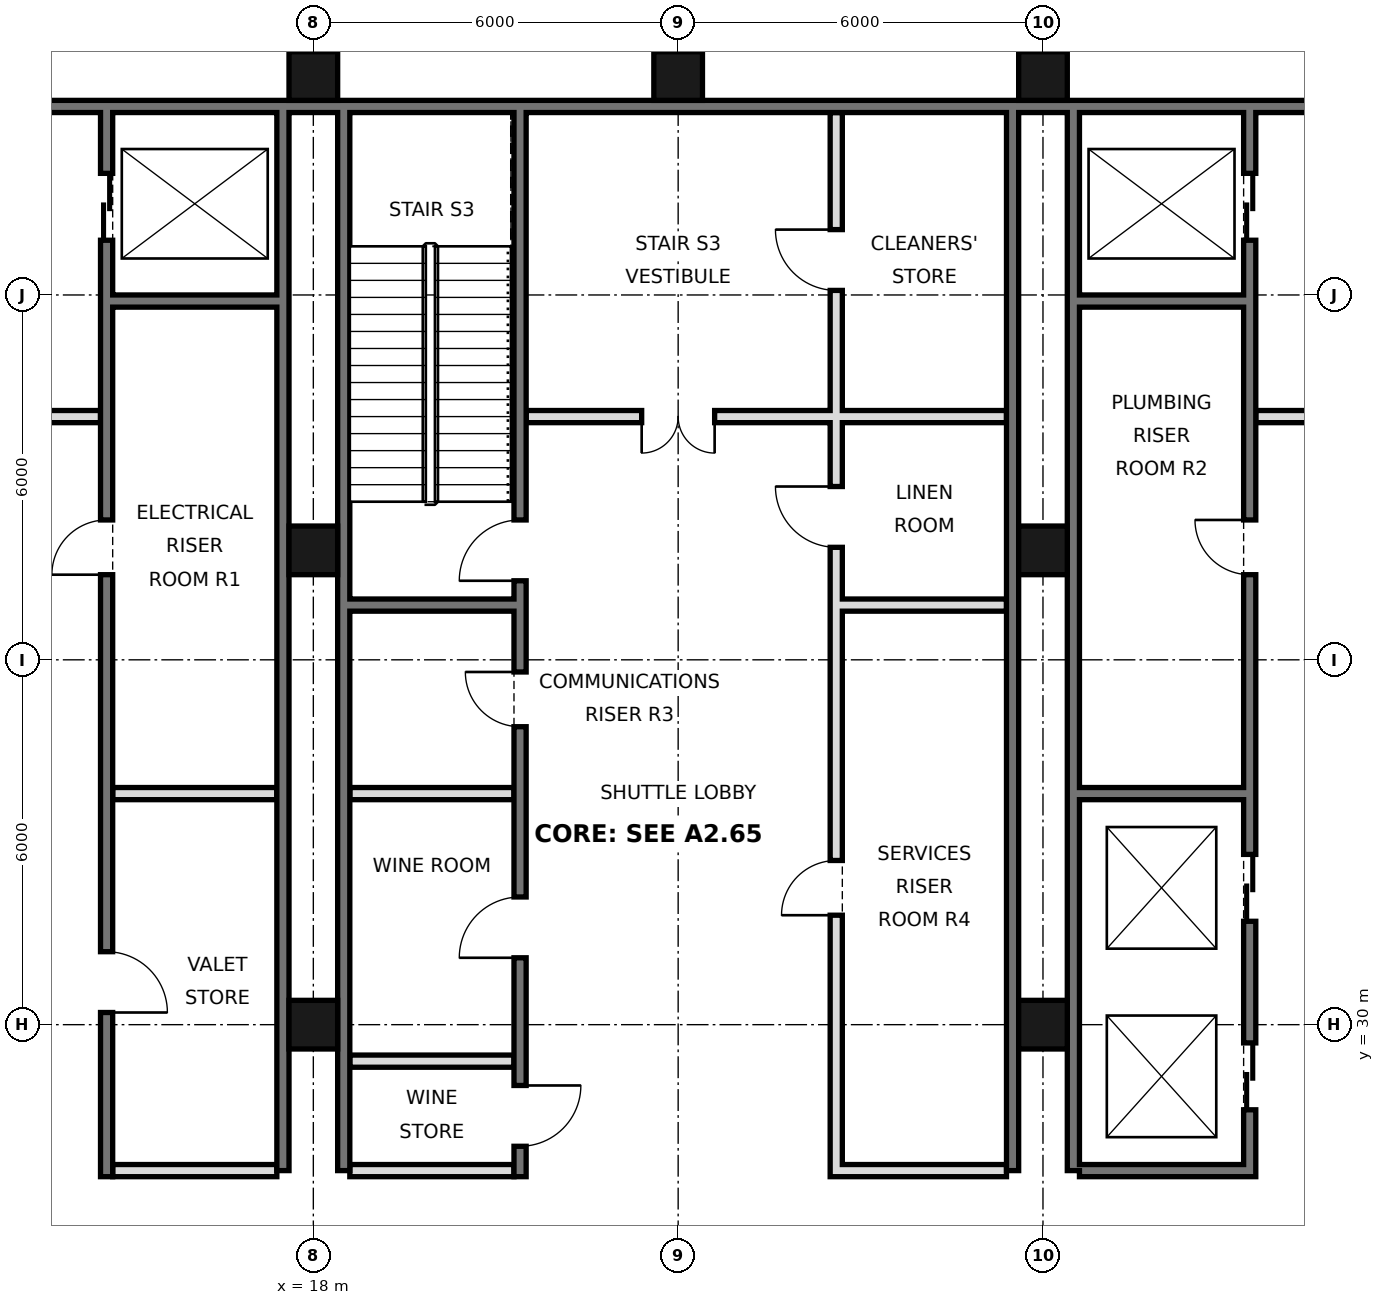
"""IFC4 building model, lengths in metres.
Left out: names, types, materials, properties, quantities, classifications, styles, units other than length and angle.
Written with IfcOpenShell. Run it as: python <this file> out.ifc"""

import sys

from ifc_helpers import new_model, si_unit, direction, frame, frame_2d, origin, origin_2d, place, context, subcontext, project, spatial, rectangle, hollow_rectangle, extrude, element, fill, save


model = new_model("IFC4")
c1 = context("Model", 3, precision=1e-05, world=origin(), true_north=direction((0.0, 1.0)))
c2 = subcontext(c1, "Body", "Model", "MODEL_VIEW")
j1 = project(units=[si_unit("LENGTHUNIT", "METRE"), si_unit("PLANEANGLEUNIT", "RADIAN")], contexts=[c1])
p1 = place(None, origin())
s1 = spatial("IfcSite", under=j1, at=p1, CompositionType="ELEMENT")
p2 = place(p1, origin())
s2 = spatial("IfcBuilding", under=s1, at=p2, CompositionType="ELEMENT")
p3 = place(p2, frame((0.0, 0.0, 257.6)))
s3 = spatial("IfcBuildingStorey", under=s2, at=p3, CompositionType="ELEMENT", Elevation=257.6)
for number, where, z_axis, x_axis in (
    (1, (18.0, 30.0, 0.0), (0.0, 0.0, 1.0), (1.0, 0.0, 0.0)),
    (2, (18.0, 37.8, 0.0), (0.0, 0.0, 1.0), (1.0, 0.0, 0.0)),
    (3, (18.0, 45.6, 0.0), (0.0, 0.0, 1.0), (1.0, 0.0, 0.0)),
    (4, (24.0, 45.6, 0.0), (0.0, 0.0, 1.0), (1.0, 0.0, 0.0)),
    (5, (30.0, 30.0, 0.0), (0.0, 0.0, 1.0), (1.0, 0.0, 0.0)),
    (6, (30.0, 37.8, 0.0), (0.0, 0.0, 1.0), (1.0, 0.0, 0.0)),
    (7, (30.0, 45.6, 0.0), (0.0, 0.0, 1.0), (1.0, 0.0, 0.0)),
):
    element("IfcColumn", number, at=place(p3, frame(where, z_axis=z_axis, x_axis=x_axis)), inside=s3, PredefinedType="COLUMN", context=c2, shape_type="SweptSolid", body=[
        extrude(hollow_rectangle(XDim=0.8, YDim=0.8, WallThickness=0.032, at=origin_2d()), origin(), (0.0, 0.0, 1.0), 5.4),
    ])
p4 = place(p3, frame((6.6, 45.1, 0.0), z_axis=(0.0, 0.0, 1.0), x_axis=(1.0, 0.0, 0.0)))
e8 = element("IfcWall", 8, at=p4, inside=s3, PredefinedType="SOLIDWALL", context=c2, shape_type="SweptSolid", body=[
    extrude(rectangle(XDim=34.8, YDim=0.2, at=frame_2d((17.4, 0.0))), origin(), (0.0, 0.0, 1.0), 5.22),
])
for number, where, z_axis, x_axis in (
    (9, (17.5, 27.6, 0.0), (0.0, 0.0, 1.0), (0.0, 1.0, 0.0)),
    (10, (18.5, 27.6, 0.0), (0.0, 0.0, 1.0), (0.0, 1.0, 0.0)),
    (11, (29.5, 27.6, 0.0), (0.0, 0.0, 1.0), (0.0, 1.0, 0.0)),
    (12, (30.5, 27.6, 0.0), (0.0, 0.0, 1.0), (0.0, 1.0, 0.0)),
):
    element("IfcWall", number, at=place(p3, frame(where, z_axis=z_axis, x_axis=x_axis)), inside=s3, PredefinedType="SOLIDWALL", context=c2, shape_type="SweptSolid", body=[
        extrude(rectangle(XDim=17.5, YDim=0.2, at=frame_2d((8.75, 0.0))), origin(), (0.0, 0.0, 1.0), 5.22),
    ])
p5 = place(p3, frame((14.6, 27.5, 0.0), z_axis=(0.0, 0.0, 1.0), x_axis=(0.0, 1.0, 0.0)))
e13 = element("IfcWall", 13, at=p5, inside=s3, PredefinedType="SOLIDWALL", context=c2, shape_type="SweptSolid", body=[
    extrude(rectangle(XDim=17.5, YDim=0.2, at=frame_2d((8.75, 0.0))), origin(), (0.0, 0.0, 1.0), 5.22),
])
p6 = place(p5, frame((15.4, 0.0, 0.0)))
e14 = element("IfcOpeningElement", 14, at=p6, cuts=e13, PredefinedType="OPENING", context=c2, shape_type="SweptSolid", body=[
    extrude(rectangle(XDim=1.1, YDim=2.1, at=frame_2d((0.55, 1.05))), frame((0.0, 0.11, 0.0), z_axis=(0.0, -1.0, 0.0), x_axis=(1.0, 0.0, 0.0)), (0.0, 0.0, 1.0), 0.22),
])
p7 = place(p5, frame((2.7, 0.0, 0.0)))
e15 = element("IfcOpeningElement", 15, at=p7, cuts=e13, PredefinedType="OPENING", context=c2, shape_type="SweptSolid", body=[
    extrude(rectangle(XDim=1.0, YDim=2.1, at=frame_2d((0.5, 1.05))), frame((0.0, 0.11, 0.0), z_axis=(0.0, -1.0, 0.0), x_axis=(1.0, 0.0, 0.0)), (0.0, 0.0, 1.0), 0.22),
])
p8 = place(p5, frame((9.9, 0.0, 0.0)))
e16 = element("IfcOpeningElement", 16, at=p8, cuts=e13, PredefinedType="OPENING", context=c2, shape_type="SweptSolid", body=[
    extrude(rectangle(XDim=0.9, YDim=2.1, at=frame_2d((0.45, 1.05))), frame((0.0, 0.11, 0.0), z_axis=(0.0, -1.0, 0.0), x_axis=(1.0, 0.0, 0.0)), (0.0, 0.0, 1.0), 0.22),
])
p9 = place(p3, frame((21.4, 27.5, 0.0), z_axis=(0.0, 0.0, 1.0), x_axis=(0.0, 1.0, 0.0)))
e17 = element("IfcWall", 17, at=p9, inside=s3, PredefinedType="SOLIDWALL", context=c2, shape_type="SweptSolid", body=[
    extrude(rectangle(XDim=17.5, YDim=0.2, at=frame_2d((8.75, 0.0))), origin(), (0.0, 0.0, 1.0), 5.22),
])
p10 = place(p9, frame((0.5, 0.0, 0.0)))
e18 = element("IfcOpeningElement", 18, at=p10, cuts=e17, PredefinedType="OPENING", context=c2, shape_type="SweptSolid", body=[
    extrude(rectangle(XDim=1.0, YDim=2.1, at=frame_2d((0.5, 1.05))), frame((0.0, 0.11, 0.0), z_axis=(0.0, -1.0, 0.0), x_axis=(1.0, 0.0, 0.0)), (0.0, 0.0, 1.0), 0.22),
])
p11 = place(p9, frame((3.6, 0.0, 0.0)))
e19 = element("IfcOpeningElement", 19, at=p11, cuts=e17, PredefinedType="OPENING", context=c2, shape_type="SweptSolid", body=[
    extrude(rectangle(XDim=1.0, YDim=2.1, at=frame_2d((0.5, 1.05))), frame((0.0, 0.11, 0.0), z_axis=(0.0, -1.0, 0.0), x_axis=(1.0, 0.0, 0.0)), (0.0, 0.0, 1.0), 0.22),
])
p12 = place(p9, frame((9.8, 0.0, 0.0)))
e20 = element("IfcOpeningElement", 20, at=p12, cuts=e17, PredefinedType="OPENING", context=c2, shape_type="SweptSolid", body=[
    extrude(rectangle(XDim=1.0, YDim=2.1, at=frame_2d((0.5, 1.05))), frame((0.0, 0.11, 0.0), z_axis=(0.0, -1.0, 0.0), x_axis=(1.0, 0.0, 0.0)), (0.0, 0.0, 1.0), 0.22),
])
p13 = place(p9, frame((7.4, 0.0, 0.0)))
e21 = element("IfcOpeningElement", 21, at=p13, cuts=e17, PredefinedType="OPENING", context=c2, shape_type="SweptSolid", body=[
    extrude(rectangle(XDim=0.9, YDim=2.1, at=frame_2d((0.45, 1.05))), frame((0.0, 0.11, 0.0), z_axis=(0.0, -1.0, 0.0), x_axis=(1.0, 0.0, 0.0)), (0.0, 0.0, 1.0), 0.22),
])
p14 = place(p3, frame((26.6, 27.5, 0.0), z_axis=(0.0, 0.0, 1.0), x_axis=(0.0, 1.0, 0.0)))
e22 = element("IfcWall", 22, at=p14, inside=s3, PredefinedType="SOLIDWALL", context=c2, shape_type="SweptSolid", body=[
    extrude(rectangle(XDim=17.5, YDim=0.2, at=frame_2d((8.75, 0.0))), origin(), (0.0, 0.0, 1.0), 5.22),
])
p15 = place(p14, frame((4.3, 0.0, 0.0)))
e23 = element("IfcOpeningElement", 23, at=p15, cuts=e22, PredefinedType="OPENING", context=c2, shape_type="SweptSolid", body=[
    extrude(rectangle(XDim=0.9, YDim=2.1, at=frame_2d((0.45, 1.05))), frame((0.0, 0.11, 0.0), z_axis=(0.0, -1.0, 0.0), x_axis=(1.0, 0.0, 0.0)), (0.0, 0.0, 1.0), 0.22),
])
p16 = place(p14, frame((10.35, 0.0, 0.0)))
e24 = element("IfcOpeningElement", 24, at=p16, cuts=e22, PredefinedType="OPENING", context=c2, shape_type="SweptSolid", body=[
    extrude(rectangle(XDim=1.0, YDim=2.1, at=frame_2d((0.5, 1.05))), frame((0.0, 0.11, 0.0), z_axis=(0.0, -1.0, 0.0), x_axis=(1.0, 0.0, 0.0)), (0.0, 0.0, 1.0), 0.22),
])
p17 = place(p14, frame((14.575, 0.0, 0.0)))
e25 = element("IfcOpeningElement", 25, at=p17, cuts=e22, PredefinedType="OPENING", context=c2, shape_type="SweptSolid", body=[
    extrude(rectangle(XDim=1.0, YDim=2.1, at=frame_2d((0.5, 1.05))), frame((0.0, 0.11, 0.0), z_axis=(0.0, -1.0, 0.0), x_axis=(1.0, 0.0, 0.0)), (0.0, 0.0, 1.0), 0.22),
])
p18 = place(p3, frame((33.4, 27.5, 0.0), z_axis=(0.0, 0.0, 1.0), x_axis=(0.0, 1.0, 0.0)))
e26 = element("IfcWall", 26, at=p18, inside=s3, PredefinedType="SOLIDWALL", context=c2, shape_type="SweptSolid", body=[
    extrude(rectangle(XDim=17.5, YDim=0.2, at=frame_2d((8.75, 0.0))), origin(), (0.0, 0.0, 1.0), 5.22),
])
p19 = place(p18, frame((1.1, 0.0, 0.0)))
e27 = element("IfcOpeningElement", 27, at=p19, cuts=e26, PredefinedType="OPENING", context=c2, shape_type="SweptSolid", body=[
    extrude(rectangle(XDim=1.1, YDim=2.1, at=frame_2d((0.55, 1.05))), frame((0.0, 0.11, 0.0), z_axis=(0.0, -1.0, 0.0), x_axis=(1.0, 0.0, 0.0)), (0.0, 0.0, 1.0), 0.22),
])
p20 = place(p18, frame((4.2, 0.0, 0.0)))
e28 = element("IfcOpeningElement", 28, at=p20, cuts=e26, PredefinedType="OPENING", context=c2, shape_type="SweptSolid", body=[
    extrude(rectangle(XDim=1.1, YDim=2.1, at=frame_2d((0.55, 1.05))), frame((0.0, 0.11, 0.0), z_axis=(0.0, -1.0, 0.0), x_axis=(1.0, 0.0, 0.0)), (0.0, 0.0, 1.0), 0.22),
])
p21 = place(p18, frame((15.4, 0.0, 0.0)))
e29 = element("IfcOpeningElement", 29, at=p21, cuts=e26, PredefinedType="OPENING", context=c2, shape_type="SweptSolid", body=[
    extrude(rectangle(XDim=1.1, YDim=2.1, at=frame_2d((0.55, 1.05))), frame((0.0, 0.11, 0.0), z_axis=(0.0, -1.0, 0.0), x_axis=(1.0, 0.0, 0.0)), (0.0, 0.0, 1.0), 0.22),
])
p22 = place(p18, frame((9.9, 0.0, 0.0)))
e30 = element("IfcOpeningElement", 30, at=p22, cuts=e26, PredefinedType="OPENING", context=c2, shape_type="SweptSolid", body=[
    extrude(rectangle(XDim=0.9, YDim=2.1, at=frame_2d((0.45, 1.05))), frame((0.0, 0.11, 0.0), z_axis=(0.0, -1.0, 0.0), x_axis=(1.0, 0.0, 0.0)), (0.0, 0.0, 1.0), 0.22),
])
for number, where, z_axis, x_axis in (
    (31, (14.7, 27.6, 0.0), (0.0, 0.0, 1.0), (1.0, 0.0, 0.0)),
    (32, (18.6, 27.6, 0.0), (0.0, 0.0, 1.0), (1.0, 0.0, 0.0)),
):
    element("IfcWall", number, at=place(p3, frame(where, z_axis=z_axis, x_axis=x_axis)), inside=s3, PredefinedType="PARTITIONING", context=c2, shape_type="SweptSolid", body=[
        extrude(rectangle(XDim=2.7, YDim=0.2, at=frame_2d((1.35, 0.0))), origin(), (0.0, 0.0, 1.0), 5.22),
    ])
for number, where, z_axis, x_axis in (
    (33, (26.7, 27.6, 0.0), (0.0, 0.0, 1.0), (1.0, 0.0, 0.0)),
    (34, (30.6, 27.6, 0.0), (0.0, 0.0, 1.0), (1.0, 0.0, 0.0)),
):
    element("IfcWall", number, at=place(p3, frame(where, z_axis=z_axis, x_axis=x_axis)), inside=s3, PredefinedType="SOLIDWALL", context=c2, shape_type="SweptSolid", body=[
        extrude(rectangle(XDim=2.7, YDim=0.2, at=frame_2d((1.35, 0.0))), origin(), (0.0, 0.0, 1.0), 5.22),
    ])
p23 = place(p3, frame((18.6, 29.4, 0.0), z_axis=(0.0, 0.0, 1.0), x_axis=(1.0, 0.0, 0.0)))
e35 = element("IfcWall", 35, at=p23, inside=s3, PredefinedType="PARTITIONING", context=c2, shape_type="SweptSolid", body=[
    extrude(rectangle(XDim=2.7, YDim=0.2, at=frame_2d((1.35, 0.0))), origin(), (0.0, 0.0, 1.0), 5.22),
])
for number, where, z_axis, x_axis in (
    (36, (14.7, 33.8, 0.0), (0.0, 0.0, 1.0), (1.0, 0.0, 0.0)),
    (37, (18.6, 33.8, 0.0), (0.0, 0.0, 1.0), (1.0, 0.0, 0.0)),
    (38, (30.6, 33.8, 0.0), (0.0, 0.0, 1.0), (1.0, 0.0, 0.0)),
    (39, (18.6, 36.9, 0.0), (0.0, 0.0, 1.0), (1.0, 0.0, 0.0)),
    (40, (26.7, 36.9, 0.0), (0.0, 0.0, 1.0), (1.0, 0.0, 0.0)),
):
    element("IfcWall", number, at=place(p3, frame(where, z_axis=z_axis, x_axis=x_axis)), inside=s3, PredefinedType="SOLIDWALL", context=c2, shape_type="SweptSolid", body=[
        extrude(rectangle(XDim=2.7, YDim=0.2, at=frame_2d((1.35, 0.0))), origin(), (0.0, 0.0, 1.0), 5.22),
    ])
p24 = place(p3, frame((21.5, 40.0, 0.0), z_axis=(0.0, 0.0, 1.0), x_axis=(1.0, 0.0, 0.0)))
e41 = element("IfcWall", 41, at=p24, inside=s3, PredefinedType="PARTITIONING", context=c2, shape_type="SweptSolid", body=[
    extrude(rectangle(XDim=7.9, YDim=0.2, at=frame_2d((3.95, 0.0))), origin(), (0.0, 0.0, 1.0), 5.22),
])
p25 = place(p24, frame((1.9, 0.0, 0.0)))
e42 = element("IfcOpeningElement", 42, at=p25, cuts=e41, PredefinedType="OPENING", context=c2, shape_type="SweptSolid", body=[
    extrude(rectangle(XDim=1.2, YDim=2.1, at=frame_2d((0.6, 1.05))), frame((0.0, 0.11, 0.0), z_axis=(0.0, -1.0, 0.0), x_axis=(1.0, 0.0, 0.0)), (0.0, 0.0, 1.0), 0.22),
])
p26 = place(p3, frame((33.5, 40.0, 0.0), z_axis=(0.0, 0.0, 1.0), x_axis=(1.0, 0.0, 0.0)))
e43 = element("IfcWall", 43, at=p26, inside=s3, PredefinedType="PARTITIONING", context=c2, shape_type="SweptSolid", body=[
    extrude(rectangle(XDim=5.0, YDim=0.2, at=frame_2d((2.5, 0.0))), origin(), (0.0, 0.0, 1.0), 5.22),
])
p27 = place(p26, frame((1.9, 0.0, 0.0)))
e44 = element("IfcOpeningElement", 44, at=p27, cuts=e43, PredefinedType="OPENING", context=c2, shape_type="SweptSolid", body=[
    extrude(rectangle(XDim=1.2, YDim=2.1, at=frame_2d((0.6, 1.05))), frame((0.0, 0.11, 0.0), z_axis=(0.0, -1.0, 0.0), x_axis=(1.0, 0.0, 0.0)), (0.0, 0.0, 1.0), 0.22),
])
p28 = place(p3, frame((9.5, 40.0, 0.0), z_axis=(0.0, 0.0, 1.0), x_axis=(1.0, 0.0, 0.0)))
e45 = element("IfcWall", 45, at=p28, inside=s3, PredefinedType="PARTITIONING", context=c2, shape_type="SweptSolid", body=[
    extrude(rectangle(XDim=5.0, YDim=0.2, at=frame_2d((2.5, 0.0))), origin(), (0.0, 0.0, 1.0), 5.22),
])
p29 = place(p28, frame((1.9, 0.0, 0.0)))
e46 = element("IfcOpeningElement", 46, at=p29, cuts=e45, PredefinedType="OPENING", context=c2, shape_type="SweptSolid", body=[
    extrude(rectangle(XDim=1.2, YDim=2.1, at=frame_2d((0.6, 1.05))), frame((0.0, 0.11, 0.0), z_axis=(0.0, -1.0, 0.0), x_axis=(1.0, 0.0, 0.0)), (0.0, 0.0, 1.0), 0.22),
])
for number, where, z_axis, x_axis in (
    (47, (14.7, 41.9, 0.0), (0.0, 0.0, 1.0), (1.0, 0.0, 0.0)),
    (48, (30.6, 41.9, 0.0), (0.0, 0.0, 1.0), (1.0, 0.0, 0.0)),
):
    element("IfcWall", number, at=place(p3, frame(where, z_axis=z_axis, x_axis=x_axis)), inside=s3, PredefinedType="SOLIDWALL", context=c2, shape_type="SweptSolid", body=[
        extrude(rectangle(XDim=2.7, YDim=0.2, at=frame_2d((1.35, 0.0))), origin(), (0.0, 0.0, 1.0), 5.22),
    ])
p30 = place(p25, frame((1.2, 0.0, 0.0), z_axis=(0.0, 0.0, 1.0), x_axis=(-1.0, 0.0, 0.0)))
e49 = element("IfcDoor", 49, at=p30, inside=s3, OperationType="DOUBLE_DOOR_SINGLE_SWING", PredefinedType="DOOR", context=c2, shape_type="SweptSolid", body=[
    extrude(rectangle(XDim=1.2, YDim=2.1, at=frame_2d((0.6, 1.05))), frame((0.0, 0.025, 0.0), z_axis=(0.0, -1.0, 0.0), x_axis=(1.0, 0.0, 0.0)), (0.0, 0.0, 1.0), 0.05),
])
fill(e42, e49)
p31 = place(p19, origin())
e50 = element("IfcDoor", 50, at=p31, inside=s3, OperationType="DOUBLE_DOOR_SLIDING", PredefinedType="DOOR", context=c2, shape_type="SweptSolid", body=[
    extrude(rectangle(XDim=1.1, YDim=2.1, at=frame_2d((0.55, 1.05))), frame((0.0, 0.025, 0.0), z_axis=(0.0, -1.0, 0.0), x_axis=(1.0, 0.0, 0.0)), (0.0, 0.0, 1.0), 0.05),
])
fill(e27, e50)
p32 = place(p20, origin())
e51 = element("IfcDoor", 51, at=p32, inside=s3, OperationType="DOUBLE_DOOR_SLIDING", PredefinedType="DOOR", context=c2, shape_type="SweptSolid", body=[
    extrude(rectangle(XDim=1.1, YDim=2.1, at=frame_2d((0.55, 1.05))), frame((0.0, 0.025, 0.0), z_axis=(0.0, -1.0, 0.0), x_axis=(1.0, 0.0, 0.0)), (0.0, 0.0, 1.0), 0.05),
])
fill(e28, e51)
p33 = place(p21, origin())
e52 = element("IfcDoor", 52, at=p33, inside=s3, OperationType="DOUBLE_DOOR_SLIDING", PredefinedType="DOOR", context=c2, shape_type="SweptSolid", body=[
    extrude(rectangle(XDim=1.1, YDim=2.1, at=frame_2d((0.55, 1.05))), frame((0.0, 0.025, 0.0), z_axis=(0.0, -1.0, 0.0), x_axis=(1.0, 0.0, 0.0)), (0.0, 0.0, 1.0), 0.05),
])
fill(e29, e52)
p34 = place(p6, origin())
e53 = element("IfcDoor", 53, at=p34, inside=s3, OperationType="DOUBLE_DOOR_SLIDING", PredefinedType="DOOR", context=c2, shape_type="SweptSolid", body=[
    extrude(rectangle(XDim=1.1, YDim=2.1, at=frame_2d((0.55, 1.05))), frame((0.0, 0.025, 0.0), z_axis=(0.0, -1.0, 0.0), x_axis=(1.0, 0.0, 0.0)), (0.0, 0.0, 1.0), 0.05),
])
fill(e14, e53)
p35 = place(p10, origin())
e54 = element("IfcDoor", 54, at=p35, inside=s3, OperationType="SINGLE_SWING_RIGHT", PredefinedType="DOOR", context=c2, shape_type="SweptSolid", body=[
    extrude(rectangle(XDim=1.0, YDim=2.1, at=frame_2d((0.5, 1.05))), frame((0.0, 0.025, 0.0), z_axis=(0.0, -1.0, 0.0), x_axis=(1.0, 0.0, 0.0)), (0.0, 0.0, 1.0), 0.05),
])
fill(e18, e54)
p36 = place(p11, origin())
e55 = element("IfcDoor", 55, at=p36, inside=s3, OperationType="SINGLE_SWING_LEFT", PredefinedType="DOOR", context=c2, shape_type="SweptSolid", body=[
    extrude(rectangle(XDim=1.0, YDim=2.1, at=frame_2d((0.5, 1.05))), frame((0.0, 0.025, 0.0), z_axis=(0.0, -1.0, 0.0), x_axis=(1.0, 0.0, 0.0)), (0.0, 0.0, 1.0), 0.05),
])
fill(e19, e55)
p37 = place(p7, frame((1.0, 0.0, 0.0), z_axis=(0.0, 0.0, 1.0), x_axis=(-1.0, 0.0, 0.0)))
e56 = element("IfcDoor", 56, at=p37, inside=s3, OperationType="SINGLE_SWING_RIGHT", PredefinedType="DOOR", context=c2, shape_type="SweptSolid", body=[
    extrude(rectangle(XDim=1.0, YDim=2.1, at=frame_2d((0.5, 1.05))), frame((0.0, 0.025, 0.0), z_axis=(0.0, -1.0, 0.0), x_axis=(1.0, 0.0, 0.0)), (0.0, 0.0, 1.0), 0.05),
])
fill(e15, e56)
p38 = place(p12, origin())
e57 = element("IfcDoor", 57, at=p38, inside=s3, OperationType="SINGLE_SWING_LEFT", PredefinedType="DOOR", context=c2, shape_type="SweptSolid", body=[
    extrude(rectangle(XDim=1.0, YDim=2.1, at=frame_2d((0.5, 1.05))), frame((0.0, 0.025, 0.0), z_axis=(0.0, -1.0, 0.0), x_axis=(1.0, 0.0, 0.0)), (0.0, 0.0, 1.0), 0.05),
])
fill(e20, e57)
p39 = place(p8, origin())
e58 = element("IfcDoor", 58, at=p39, inside=s3, OperationType="SINGLE_SWING_LEFT", PredefinedType="DOOR", context=c2, shape_type="SweptSolid", body=[
    extrude(rectangle(XDim=0.9, YDim=2.1, at=frame_2d((0.45, 1.05))), frame((0.0, 0.025, 0.0), z_axis=(0.0, -1.0, 0.0), x_axis=(1.0, 0.0, 0.0)), (0.0, 0.0, 1.0), 0.05),
])
fill(e16, e58)
p40 = place(p22, frame((0.9, 0.0, 0.0), z_axis=(0.0, 0.0, 1.0), x_axis=(-1.0, 0.0, 0.0)))
e59 = element("IfcDoor", 59, at=p40, inside=s3, OperationType="SINGLE_SWING_LEFT", PredefinedType="DOOR", context=c2, shape_type="SweptSolid", body=[
    extrude(rectangle(XDim=0.9, YDim=2.1, at=frame_2d((0.45, 1.05))), frame((0.0, 0.025, 0.0), z_axis=(0.0, -1.0, 0.0), x_axis=(1.0, 0.0, 0.0)), (0.0, 0.0, 1.0), 0.05),
])
fill(e30, e59)
p41 = place(p13, frame((0.9, 0.0, 0.0), z_axis=(0.0, 0.0, 1.0), x_axis=(-1.0, 0.0, 0.0)))
e60 = element("IfcDoor", 60, at=p41, inside=s3, OperationType="SINGLE_SWING_LEFT", PredefinedType="DOOR", context=c2, shape_type="SweptSolid", body=[
    extrude(rectangle(XDim=0.9, YDim=2.1, at=frame_2d((0.45, 1.05))), frame((0.0, 0.025, 0.0), z_axis=(0.0, -1.0, 0.0), x_axis=(1.0, 0.0, 0.0)), (0.0, 0.0, 1.0), 0.05),
])
fill(e21, e60)
p42 = place(p15, origin())
e61 = element("IfcDoor", 61, at=p42, inside=s3, OperationType="SINGLE_SWING_LEFT", PredefinedType="DOOR", context=c2, shape_type="SweptSolid", body=[
    extrude(rectangle(XDim=0.9, YDim=2.1, at=frame_2d((0.45, 1.05))), frame((0.0, 0.025, 0.0), z_axis=(0.0, -1.0, 0.0), x_axis=(1.0, 0.0, 0.0)), (0.0, 0.0, 1.0), 0.05),
])
fill(e23, e61)
p43 = place(p16, frame((1.0, 0.0, 0.0), z_axis=(0.0, 0.0, 1.0), x_axis=(-1.0, 0.0, 0.0)))
e62 = element("IfcDoor", 62, at=p43, inside=s3, OperationType="SINGLE_SWING_LEFT", PredefinedType="DOOR", context=c2, shape_type="SweptSolid", body=[
    extrude(rectangle(XDim=1.0, YDim=2.1, at=frame_2d((0.5, 1.05))), frame((0.0, 0.025, 0.0), z_axis=(0.0, -1.0, 0.0), x_axis=(1.0, 0.0, 0.0)), (0.0, 0.0, 1.0), 0.05),
])
fill(e24, e62)
p44 = place(p17, frame((1.0, 0.0, 0.0), z_axis=(0.0, 0.0, 1.0), x_axis=(-1.0, 0.0, 0.0)))
e63 = element("IfcDoor", 63, at=p44, inside=s3, OperationType="SINGLE_SWING_LEFT", PredefinedType="DOOR", context=c2, shape_type="SweptSolid", body=[
    extrude(rectangle(XDim=1.0, YDim=2.1, at=frame_2d((0.5, 1.05))), frame((0.0, 0.025, 0.0), z_axis=(0.0, -1.0, 0.0), x_axis=(1.0, 0.0, 0.0)), (0.0, 0.0, 1.0), 0.05),
])
fill(e25, e63)
save(model, sys.argv[1])
